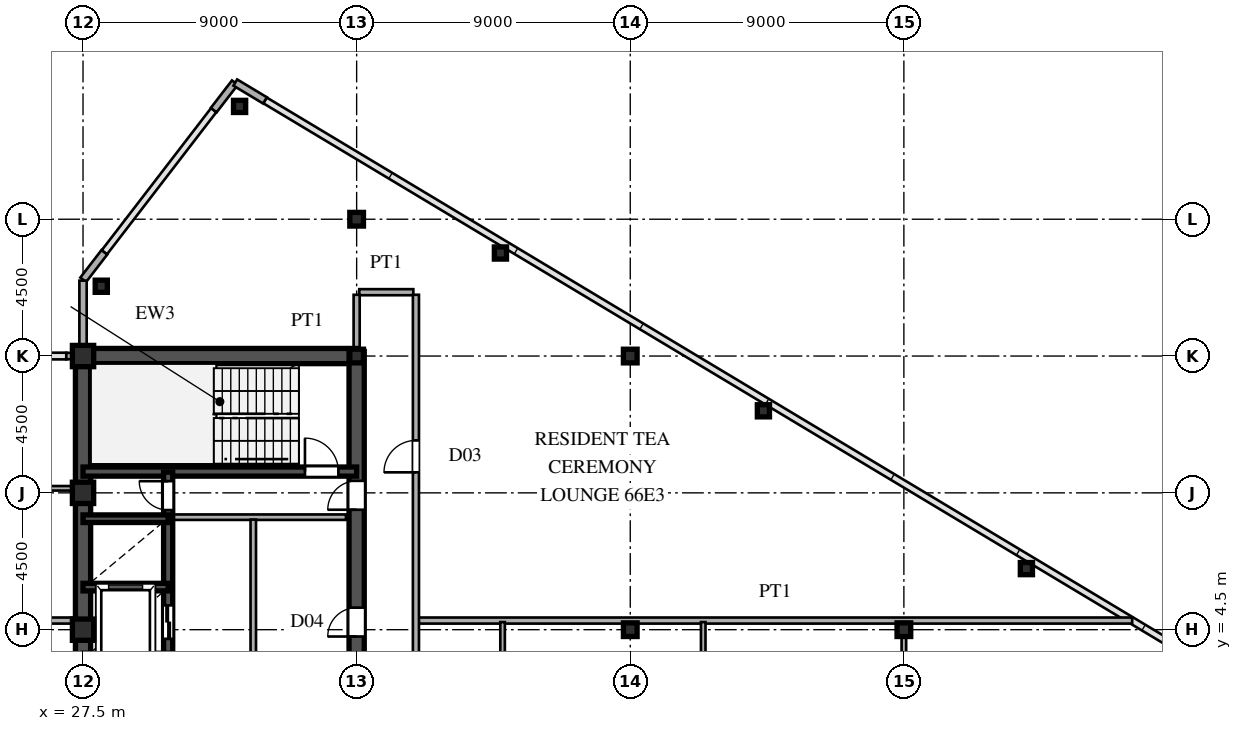
"""IFC4 building model, lengths in metres.
Left out: names, types, materials, properties, quantities, classifications, styles, units other than length and angle.
Written with IfcOpenShell. Run it as: python <this file> out.ifc"""

import sys

from ifc_helpers import new_model, si_unit, direction, frame, frame_2d, origin, origin_2d, place, context, subcontext, project, spatial, rectangle, hollow_rectangle, i_section, extrude, source, transform, mapped, element, fill, save


model = new_model("IFC4")
c1 = context("Model", 3, precision=1e-05, world=origin(), true_north=direction((0.0, 1.0)))
c2 = subcontext(c1, "Body", "Model", "MODEL_VIEW")
j1 = project(units=[si_unit("LENGTHUNIT", "METRE"), si_unit("PLANEANGLEUNIT", "RADIAN")], contexts=[c1])
p1 = place(None, origin())
s1 = spatial("IfcSite", under=j1, at=p1, CompositionType="ELEMENT")
p2 = place(p1, origin())
s2 = spatial("IfcBuilding", under=s1, at=p2, CompositionType="ELEMENT")
p3 = place(p2, frame((0.0, 0.0, 250.65)))
s3 = spatial("IfcBuildingStorey", under=s2, at=p3, CompositionType="ELEMENT", Elevation=250.65)
m1 = source(origin(), c2, "Body", "SweptSolid", [
    extrude(hollow_rectangle(XDim=0.7, YDim=0.7, WallThickness=0.03, at=origin_2d()), origin(), (0.0, 0.0, 1.0), 3.75),
])
for number, where, z_axis, x_axis in (
    (1, (27.5, 4.5, 0.0), (0.0, 0.0, 1.0), (1.0, 0.0, 0.0)),
    (2, (27.5, 9.0, 0.0), (0.0, 0.0, 1.0), (1.0, 0.0, 0.0)),
    (3, (27.5, 13.5, 0.0), (0.0, 0.0, 1.0), (1.0, 0.0, 0.0)),
):
    element("IfcColumn", number, at=place(p3, frame(where, z_axis=z_axis, x_axis=x_axis)), inside=s3, PredefinedType="COLUMN", context=c2, shape_type="MappedRepresentation", body=[
        mapped(m1, transform((0.0, 0.0, 0.0), scale=1.0)),
    ])
m2 = source(origin(), c2, "Body", "SweptSolid", [
    extrude(i_section(OverallWidth=0.45, OverallDepth=0.45, WebThickness=0.016, FlangeThickness=0.025, at=origin_2d()), origin(), (0.0, 0.0, 1.0), 3.75),
])
for number, where, z_axis, x_axis in (
    (4, (36.5, 13.5, 0.0), (0.0, 0.0, 1.0), (1.0, 0.0, 0.0)),
    (5, (36.5, 18.0, 0.0), (0.0, 0.0, 1.0), (1.0, 0.0, 0.0)),
    (6, (45.5, 4.5, 0.0), (0.0, 0.0, 1.0), (1.0, 0.0, 0.0)),
    (7, (45.5, 13.5, 0.0), (0.0, 0.0, 1.0), (1.0, 0.0, 0.0)),
    (8, (54.5, 4.5, 0.0), (0.0, 0.0, 1.0), (1.0, 0.0, 0.0)),
):
    element("IfcColumn", number, at=place(p3, frame(where, z_axis=z_axis, x_axis=x_axis)), inside=s3, PredefinedType="COLUMN", context=c2, shape_type="MappedRepresentation", body=[
        mapped(m2, transform((0.0, 0.0, 0.0), scale=1.0)),
    ])
m3 = source(origin(), c2, "Body", "SweptSolid", [
    extrude(hollow_rectangle(XDim=0.4, YDim=0.4, WallThickness=0.016, at=origin_2d()), origin(), (0.0, 0.0, 1.0), 3.75),
])
for number, where, z_axis, x_axis in (
    (9, (32.65, 21.71, 0.0), (0.0, 0.0, 1.0), (1.0, 0.0, 0.0)),
    (10, (28.1, 15.796, 0.0), (0.0, 0.0, 1.0), (1.0, 0.0, 0.0)),
    (11, (41.23, 16.889, 0.0), (0.0, 0.0, 1.0), (1.0, 0.0, 0.0)),
    (12, (49.88, 11.699, 0.0), (0.0, 0.0, 1.0), (1.0, 0.0, 0.0)),
    (13, (58.53, 6.509, 0.0), (0.0, 0.0, 1.0), (1.0, 0.0, 0.0)),
):
    element("IfcColumn", number, at=place(p3, frame(where, z_axis=z_axis, x_axis=x_axis)), inside=s3, PredefinedType="COLUMN", context=c2, shape_type="MappedRepresentation", body=[
        mapped(m3, transform((0.0, 0.0, 0.0), scale=1.0)),
    ])
for number, where, z_axis, x_axis in (
    (14, (33.486, 21.908, 0.0), (0.0, 0.0, 1.0), (-0.857, 0.515, 0.0)),
    (15, (32.494, 22.492, 0.0), (0.0, 0.0, 1.0), (-0.61, -0.793, 0.0)),
    (16, (28.201, 16.912, 0.0), (0.0, 0.0, 1.0), (-0.61, -0.793, 0.0)),
):
    element("IfcWall", number, at=place(p3, frame(where, z_axis=z_axis, x_axis=x_axis)), inside=s3, PredefinedType="SOLIDWALL", context=c2, shape_type="SweptSolid", body=[
        extrude(rectangle(XDim=1.14, YDim=0.24, at=frame_2d((0.57, 0.0))), origin(), (0.0, 0.0, 1.0), 3.53),
    ])
p4 = place(p3, frame((27.5, 13.755, 0.0), z_axis=(0.0, 0.0, 1.0), x_axis=(0.0, 1.0, 0.0)))
e17 = element("IfcWall", 17, at=p4, inside=s3, PredefinedType="SOLIDWALL", context=c2, shape_type="SweptSolid", body=[
    extrude(rectangle(XDim=0.62, YDim=0.24, at=frame_2d((0.31, 0.0))), origin(), (0.0, 0.0, 1.0), 3.03),
])
p5 = place(p3, frame((27.5, 14.375, 0.0), z_axis=(0.0, 0.0, 1.0), x_axis=(0.0, 1.0, 0.0)))
e18 = element("IfcWall", 18, at=p5, inside=s3, PredefinedType="SOLIDWALL", context=c2, shape_type="SweptSolid", body=[
    extrude(rectangle(XDim=1.605, YDim=0.24, at=frame_2d((0.803, 0.0))), origin(), (0.0, 0.0, 1.0), 3.53),
])
p6 = place(p3, frame((26.95, 13.5, 0.0), z_axis=(0.0, 0.0, 1.0), x_axis=(1.0, 0.0, 0.0)))
e19 = element("IfcWall", 19, at=p6, inside=s3, PredefinedType="SOLIDWALL", context=c2, shape_type="SweptSolid", body=[
    extrude(rectangle(XDim=0.54, YDim=0.21, at=frame_2d((0.27, 0.0))), origin(), (0.0, 0.0, 1.0), 3.03),
])
p7 = place(p3, frame((27.5, 1.3, 0.0), z_axis=(0.0, 0.0, 1.0), x_axis=(0.0, 1.0, 0.0)))
e20 = element("IfcWall", 20, at=p7, inside=s3, PredefinedType="SHEAR", context=c2, shape_type="SweptSolid", body=[
    extrude(rectangle(XDim=12.2, YDim=0.5, at=frame_2d((6.1, 0.0))), origin(), (0.0, 0.0, 1.0), 3.53),
])
p8 = place(p3, frame((27.5, 13.5, 0.0), z_axis=(0.0, 0.0, 1.0), x_axis=(1.0, 0.0, 0.0)))
e21 = element("IfcWall", 21, at=p8, inside=s3, PredefinedType="SHEAR", context=c2, shape_type="SweptSolid", body=[
    extrude(rectangle(XDim=9.0, YDim=0.5, at=frame_2d((4.5, 0.0))), origin(), (0.0, 0.0, 1.0), 3.53),
])
p9 = place(p3, frame((36.5, 8.2, 0.0), z_axis=(0.0, 0.0, 1.0), x_axis=(0.0, 1.0, 0.0)))
e22 = element("IfcWall", 22, at=p9, inside=s3, PredefinedType="SHEAR", context=c2, shape_type="SweptSolid", body=[
    extrude(rectangle(XDim=5.45, YDim=0.5, at=frame_2d((2.725, 0.0))), origin(), (0.0, 0.0, 1.0), 3.53),
])
p10 = place(p9, frame((0.245, 0.0, 0.0)))
e23 = element("IfcOpeningElement", 23, at=p10, cuts=e22, PredefinedType="OPENING", context=c2, shape_type="SweptSolid", body=[
    extrude(rectangle(XDim=0.95, YDim=2.15, at=frame_2d((0.475, 1.075))), frame((0.0, 0.26, 0.0), z_axis=(0.0, -1.0, 0.0), x_axis=(1.0, 0.0, 0.0)), (0.0, 0.0, 1.0), 0.52),
])
p11 = place(p3, frame((36.5, 1.3, 0.0), z_axis=(0.0, 0.0, 1.0), x_axis=(0.0, 1.0, 0.0)))
e24 = element("IfcWall", 24, at=p11, inside=s3, PredefinedType="SHEAR", context=c2, shape_type="SweptSolid", body=[
    extrude(rectangle(XDim=6.9, YDim=0.5, at=frame_2d((3.45, 0.0))), origin(), (0.0, 0.0, 1.0), 3.53),
])
p12 = place(p11, frame((2.975, 0.0, 0.0)))
e25 = element("IfcOpeningElement", 25, at=p12, cuts=e24, PredefinedType="OPENING", context=c2, shape_type="SweptSolid", body=[
    extrude(rectangle(XDim=0.95, YDim=2.15, at=frame_2d((0.475, 1.075))), frame((0.0, 0.26, 0.0), z_axis=(0.0, -1.0, 0.0), x_axis=(1.0, 0.0, 0.0)), (0.0, 0.0, 1.0), 0.52),
])
p13 = place(p3, frame((27.5, 9.7, 0.0), z_axis=(0.0, 0.0, 1.0), x_axis=(1.0, 0.0, 0.0)))
e26 = element("IfcWall", 26, at=p13, inside=s3, PredefinedType="SHEAR", context=c2, shape_type="SweptSolid", body=[
    extrude(rectangle(XDim=9.0, YDim=0.3, at=frame_2d((4.5, 0.0))), origin(), (0.0, 0.0, 1.0), 3.53),
])
p14 = place(p13, frame((7.3, 0.0, 0.0)))
e27 = element("IfcOpeningElement", 27, at=p14, cuts=e26, PredefinedType="OPENING", context=c2, shape_type="SweptSolid", body=[
    extrude(rectangle(XDim=1.1, YDim=2.2, at=frame_2d((0.55, 1.1))), frame((0.0, 0.16, 0.0), z_axis=(0.0, -1.0, 0.0), x_axis=(1.0, 0.0, 0.0)), (0.0, 0.0, 1.0), 0.32),
])
for number, where, z_axis, x_axis in (
    (28, (27.5, 5.9, 0.0), (0.0, 0.0, 1.0), (1.0, 0.0, 0.0)),
    (29, (27.5, 8.15, 0.0), (0.0, 0.0, 1.0), (1.0, 0.0, 0.0)),
):
    element("IfcWall", number, at=place(p3, frame(where, z_axis=z_axis, x_axis=x_axis)), inside=s3, PredefinedType="SHEAR", context=c2, shape_type="SweptSolid", body=[
        extrude(rectangle(XDim=2.8, YDim=0.25, at=frame_2d((1.4, 0.0))), origin(), (0.0, 0.0, 1.0), 3.53),
    ])
p15 = place(p3, frame((30.3, 3.6, 0.0), z_axis=(0.0, 0.0, 1.0), x_axis=(0.0, 1.0, 0.0)))
e30 = element("IfcWall", 30, at=p15, inside=s3, PredefinedType="SHEAR", context=c2, shape_type="SweptSolid", body=[
    extrude(rectangle(XDim=2.3, YDim=0.3, at=frame_2d((1.15, 0.0))), origin(), (0.0, 0.0, 1.0), 3.53),
])
p16 = place(p15, frame((0.6, 0.0, 0.0)))
e31 = element("IfcOpeningElement", 31, at=p16, cuts=e30, PredefinedType="OPENING", context=c2, shape_type="SweptSolid", body=[
    extrude(rectangle(XDim=1.1, YDim=2.2, at=frame_2d((0.55, 1.1))), frame((0.0, 0.16, 0.0), z_axis=(0.0, -1.0, 0.0), x_axis=(1.0, 0.0, 0.0)), (0.0, 0.0, 1.0), 0.32),
])
p17 = place(p3, frame((30.3, 5.9, 0.0), z_axis=(0.0, 0.0, 1.0), x_axis=(0.0, 1.0, 0.0)))
e32 = element("IfcWall", 32, at=p17, inside=s3, PredefinedType="SHEAR", context=c2, shape_type="SweptSolid", body=[
    extrude(rectangle(XDim=2.25, YDim=0.3, at=frame_2d((1.125, 0.0))), origin(), (0.0, 0.0, 1.0), 3.53),
])
p18 = place(p3, frame((30.3, 8.15, 0.0), z_axis=(0.0, 0.0, 1.0), x_axis=(0.0, 1.0, 0.0)))
e33 = element("IfcWall", 33, at=p18, inside=s3, PredefinedType="SHEAR", context=c2, shape_type="SweptSolid", body=[
    extrude(rectangle(XDim=1.53, YDim=0.3, at=frame_2d((0.765, 0.0))), origin(), (0.0, 0.0, 1.0), 3.53),
])
p19 = place(p18, frame((0.285, 0.0, 0.0)))
e34 = element("IfcOpeningElement", 34, at=p19, cuts=e33, PredefinedType="OPENING", context=c2, shape_type="SweptSolid", body=[
    extrude(rectangle(XDim=0.95, YDim=2.15, at=frame_2d((0.475, 1.075))), frame((0.0, 0.16, 0.0), z_axis=(0.0, -1.0, 0.0), x_axis=(1.0, 0.0, 0.0)), (0.0, 0.0, 1.0), 0.32),
])
p20 = place(p3, frame((30.45, 8.2, 0.0), z_axis=(0.0, 0.0, 1.0), x_axis=(1.0, 0.0, 0.0)))
e35 = element("IfcWall", 35, at=p20, inside=s3, PredefinedType="PARTITIONING", context=c2, shape_type="SweptSolid", body=[
    extrude(rectangle(XDim=5.7, YDim=0.18, at=frame_2d((2.85, 0.0))), origin(), (0.0, 0.0, 1.0), 3.53),
])
p21 = place(p3, frame((33.1, 1.38, 0.0), z_axis=(0.0, 0.0, 1.0), x_axis=(0.0, 1.0, 0.0)))
e36 = element("IfcWall", 36, at=p21, inside=s3, PredefinedType="PARTITIONING", context=c2, shape_type="SweptSolid", body=[
    extrude(rectangle(XDim=6.74, YDim=0.18, at=frame_2d((3.37, 0.0))), origin(), (0.0, 0.0, 1.0), 3.53),
])
p22 = place(p3, frame((-27.245, 4.8, 0.0), z_axis=(0.0, 0.0, 1.0), x_axis=(1.0, 0.0, 0.0)))
e37 = element("IfcWall", 37, at=p22, inside=s3, PredefinedType="PARTITIONING", context=c2, shape_type="SweptSolid", body=[
    extrude(rectangle(XDim=54.49, YDim=0.2, at=frame_2d((27.245, 0.0))), origin(), (0.0, 0.0, 1.0), 3.53),
])
p23 = place(p22, frame((24.97, 0.0, 0.0)))
e38 = element("IfcOpeningElement", 38, at=p23, cuts=e37, PredefinedType="OPENING", context=c2, shape_type="SweptSolid", body=[
    extrude(rectangle(XDim=1.05, YDim=2.25, at=frame_2d((0.525, 1.125))), frame((0.0, 0.11, 0.0), z_axis=(0.0, -1.0, 0.0), x_axis=(1.0, 0.0, 0.0)), (0.0, 0.0, 1.0), 0.22),
])
p24 = place(p3, frame((38.53, 4.8, 0.0), z_axis=(0.0, 0.0, 1.0), x_axis=(1.0, 0.0, 0.0)))
e39 = element("IfcWall", 39, at=p24, inside=s3, PredefinedType="PARTITIONING", context=c2, shape_type="SweptSolid", body=[
    extrude(rectangle(XDim=23.48, YDim=0.2, at=frame_2d((11.74, 0.0))), origin(), (0.0, 0.0, 1.0), 3.53),
])
p25 = place(p3, frame((7.085, 9.15, 0.0), z_axis=(0.0, 0.0, 1.0), x_axis=(1.0, 0.0, 0.0)))
e40 = element("IfcWall", 40, at=p25, inside=s3, PredefinedType="PARTITIONING", context=c2, shape_type="SweptSolid", body=[
    extrude(rectangle(XDim=20.16, YDim=0.15, at=frame_2d((10.08, 0.0))), origin(), (0.0, 0.0, 1.0), 3.53),
])
p26 = place(p25, frame((3.44, 0.0, 0.0)))
e41 = element("IfcOpeningElement", 41, at=p26, cuts=e40, PredefinedType="OPENING", context=c2, shape_type="SweptSolid", body=[
    extrude(rectangle(XDim=0.95, YDim=2.15, at=frame_2d((0.475, 1.075))), frame((0.0, 0.085, 0.0), z_axis=(0.0, -1.0, 0.0), x_axis=(1.0, 0.0, 0.0)), (0.0, 0.0, 1.0), 0.17),
])
p27 = place(p25, frame((10.69, 0.0, 0.0)))
e42 = element("IfcOpeningElement", 42, at=p27, cuts=e40, PredefinedType="OPENING", context=c2, shape_type="SweptSolid", body=[
    extrude(rectangle(XDim=0.95, YDim=2.15, at=frame_2d((0.475, 1.075))), frame((0.0, 0.085, 0.0), z_axis=(0.0, -1.0, 0.0), x_axis=(1.0, 0.0, 0.0)), (0.0, 0.0, 1.0), 0.17),
])
p28 = place(p25, frame((16.94, 0.0, 0.0)))
e43 = element("IfcOpeningElement", 43, at=p28, cuts=e40, PredefinedType="OPENING", context=c2, shape_type="SweptSolid", body=[
    extrude(rectangle(XDim=0.95, YDim=2.15, at=frame_2d((0.475, 1.075))), frame((0.0, 0.085, 0.0), z_axis=(0.0, -1.0, 0.0), x_axis=(1.0, 0.0, 0.0)), (0.0, 0.0, 1.0), 0.17),
])
p29 = place(p3, frame((36.585, 15.6, 0.0), z_axis=(0.0, 0.0, 1.0), x_axis=(1.0, 0.0, 0.0)))
e44 = element("IfcWall", 44, at=p29, inside=s3, PredefinedType="PARTITIONING", context=c2, shape_type="SweptSolid", body=[
    extrude(rectangle(XDim=1.78, YDim=0.2, at=frame_2d((0.89, 0.0))), origin(), (0.0, 0.0, 1.0), 3.53),
])
p30 = place(p3, frame((36.5, 13.755, 0.0), z_axis=(0.0, 0.0, 1.0), x_axis=(0.0, 1.0, 0.0)))
e45 = element("IfcWall", 45, at=p30, inside=s3, PredefinedType="PARTITIONING", context=c2, shape_type="SweptSolid", body=[
    extrude(rectangle(XDim=1.76, YDim=0.2, at=frame_2d((0.88, 0.0))), origin(), (0.0, 0.0, 1.0), 2.93),
])
p31 = place(p3, frame((38.45, -15.515, 0.0), z_axis=(0.0, 0.0, 1.0), x_axis=(0.0, 1.0, 0.0)))
e46 = element("IfcWall", 46, at=p31, inside=s3, PredefinedType="PARTITIONING", context=c2, shape_type="SweptSolid", body=[
    extrude(rectangle(XDim=31.03, YDim=0.2, at=frame_2d((15.515, 0.0))), origin(), (0.0, 0.0, 1.0), 3.53),
])
p32 = place(p31, frame((3.09, 0.0, 0.0)))
e47 = element("IfcOpeningElement", 47, at=p32, cuts=e46, PredefinedType="OPENING", context=c2, shape_type="SweptSolid", body=[
    extrude(rectangle(XDim=1.05, YDim=2.25, at=frame_2d((0.525, 1.125))), frame((0.0, 0.11, 0.0), z_axis=(0.0, -1.0, 0.0), x_axis=(1.0, 0.0, 0.0)), (0.0, 0.0, 1.0), 0.22),
])
p33 = place(p31, frame((13.095, 0.0, 0.0)))
e48 = element("IfcOpeningElement", 48, at=p33, cuts=e46, PredefinedType="OPENING", context=c2, shape_type="SweptSolid", body=[
    extrude(rectangle(XDim=1.05, YDim=2.25, at=frame_2d((0.525, 1.125))), frame((0.0, 0.11, 0.0), z_axis=(0.0, -1.0, 0.0), x_axis=(1.0, 0.0, 0.0)), (0.0, 0.0, 1.0), 0.22),
])
p34 = place(p31, frame((25.19, 0.0, 0.0)))
e49 = element("IfcOpeningElement", 49, at=p34, cuts=e46, PredefinedType="OPENING", context=c2, shape_type="SweptSolid", body=[
    extrude(rectangle(XDim=1.05, YDim=2.25, at=frame_2d((0.525, 1.125))), frame((0.0, 0.11, 0.0), z_axis=(0.0, -1.0, 0.0), x_axis=(1.0, 0.0, 0.0)), (0.0, 0.0, 1.0), 0.22),
])
p35 = place(p3, frame((41.3, 0.952, 0.0), z_axis=(0.0, 0.0, 1.0), x_axis=(0.0, 1.0, 0.0)))
e50 = element("IfcWall", 50, at=p35, inside=s3, PredefinedType="PARTITIONING", context=c2, shape_type="SweptSolid", body=[
    extrude(rectangle(XDim=3.798, YDim=0.15, at=frame_2d((1.899, 0.0))), origin(), (0.0, 0.0, 1.0), 3.53),
])
p36 = place(p3, frame((47.9, -8.15, 0.0), z_axis=(0.0, 0.0, 1.0), x_axis=(0.0, 1.0, 0.0)))
e51 = element("IfcWall", 51, at=p36, inside=s3, PredefinedType="PARTITIONING", context=c2, shape_type="SweptSolid", body=[
    extrude(rectangle(XDim=12.9, YDim=0.15, at=frame_2d((6.45, 0.0))), origin(), (0.0, 0.0, 1.0), 3.53),
])
p37 = place(p36, frame((5.975, 0.0, 0.0)))
e52 = element("IfcOpeningElement", 52, at=p37, cuts=e51, PredefinedType="OPENING", context=c2, shape_type="SweptSolid", body=[
    extrude(rectangle(XDim=0.95, YDim=2.15, at=frame_2d((0.475, 1.075))), frame((0.0, 0.085, 0.0), z_axis=(0.0, -1.0, 0.0), x_axis=(1.0, 0.0, 0.0)), (0.0, 0.0, 1.0), 0.17),
])
p38 = place(p36, frame((1.642, 0.0, 0.0)))
e53 = element("IfcOpeningElement", 53, at=p38, cuts=e51, PredefinedType="OPENING", context=c2, shape_type="SweptSolid", body=[
    extrude(rectangle(XDim=0.95, YDim=2.15, at=frame_2d((0.475, 1.075))), frame((0.0, 0.085, 0.0), z_axis=(0.0, -1.0, 0.0), x_axis=(1.0, 0.0, 0.0)), (0.0, 0.0, 1.0), 0.17),
])
p39 = place(p3, frame((54.5, -8.15, 0.0), z_axis=(0.0, 0.0, 1.0), x_axis=(0.0, 1.0, 0.0)))
e54 = element("IfcWall", 54, at=p39, inside=s3, PredefinedType="PARTITIONING", context=c2, shape_type="SweptSolid", body=[
    extrude(rectangle(XDim=12.9, YDim=0.15, at=frame_2d((6.45, 0.0))), origin(), (0.0, 0.0, 1.0), 2.93),
])
p40 = place(p39, frame((5.975, 0.0, 0.0)))
e55 = element("IfcOpeningElement", 55, at=p40, cuts=e54, PredefinedType="OPENING", context=c2, shape_type="SweptSolid", body=[
    extrude(rectangle(XDim=0.95, YDim=2.15, at=frame_2d((0.475, 1.075))), frame((0.0, 0.085, 0.0), z_axis=(0.0, -1.0, 0.0), x_axis=(1.0, 0.0, 0.0)), (0.0, 0.0, 1.0), 0.17),
])
p41 = place(p39, frame((1.642, 0.0, 0.0)))
e56 = element("IfcOpeningElement", 56, at=p41, cuts=e54, PredefinedType="OPENING", context=c2, shape_type="SweptSolid", body=[
    extrude(rectangle(XDim=0.95, YDim=2.15, at=frame_2d((0.475, 1.075))), frame((0.0, 0.085, 0.0), z_axis=(0.0, -1.0, 0.0), x_axis=(1.0, 0.0, 0.0)), (0.0, 0.0, 1.0), 0.17),
])
p42 = place(p39, frame((10.308, 0.0, 0.0)))
e57 = element("IfcOpeningElement", 57, at=p42, cuts=e54, PredefinedType="OPENING", context=c2, shape_type="SweptSolid", body=[
    extrude(rectangle(XDim=0.95, YDim=2.15, at=frame_2d((0.475, 1.075))), frame((0.0, 0.085, 0.0), z_axis=(0.0, -1.0, 0.0), x_axis=(1.0, 0.0, 0.0)), (0.0, 0.0, 1.0), 0.17),
])
m4 = source(origin(), c2, "Body", "SweptSolid", [
    extrude(rectangle(XDim=0.95, YDim=2.15, at=frame_2d((0.475, 1.075))), frame((0.0, 0.025, 0.0), z_axis=(0.0, -1.0, 0.0), x_axis=(1.0, 0.0, 0.0)), (0.0, 0.0, 1.0), 0.05),
])
p43 = place(p10, origin())
e58 = element("IfcDoor", 58, at=p43, inside=s3, OperationType="SINGLE_SWING_LEFT", PredefinedType="DOOR", context=c2, shape_type="MappedRepresentation", body=[
    mapped(m4, transform((0.0, 0.0, 0.0), scale=1.0)),
])
fill(e23, e58)
p44 = place(p12, origin())
e59 = element("IfcDoor", 59, at=p44, inside=s3, OperationType="SINGLE_SWING_LEFT", PredefinedType="DOOR", context=c2, shape_type="MappedRepresentation", body=[
    mapped(m4, transform((0.0, 0.0, 0.0), scale=1.0)),
])
fill(e25, e59)
m5 = source(origin(), c2, "Body", "SweptSolid", [
    extrude(rectangle(XDim=1.1, YDim=2.2, at=frame_2d((0.55, 1.1))), frame((0.0, 0.025, 0.0), z_axis=(0.0, -1.0, 0.0), x_axis=(1.0, 0.0, 0.0)), (0.0, 0.0, 1.0), 0.05),
])
p45 = place(p14, origin())
e60 = element("IfcDoor", 60, at=p45, inside=s3, OperationType="SINGLE_SWING_LEFT", PredefinedType="DOOR", context=c2, shape_type="MappedRepresentation", body=[
    mapped(m5, transform((0.0, 0.0, 0.0), scale=1.0)),
])
fill(e27, e60)
m6 = source(origin(), c2, "Body", "SweptSolid", [
    extrude(rectangle(XDim=1.1, YDim=2.2, at=frame_2d((0.55, 1.1))), frame((0.0, 0.025, 0.0), z_axis=(0.0, -1.0, 0.0), x_axis=(1.0, 0.0, 0.0)), (0.0, 0.0, 1.0), 0.05),
])
p46 = place(p16, origin())
e61 = element("IfcDoor", 61, at=p46, inside=s3, OperationType="DOUBLE_DOOR_SLIDING", PredefinedType="DOOR", context=c2, shape_type="MappedRepresentation", body=[
    mapped(m6, transform((0.0, 0.0, 0.0), scale=1.0)),
])
fill(e31, e61)
p47 = place(p19, origin())
e62 = element("IfcDoor", 62, at=p47, inside=s3, OperationType="SINGLE_SWING_RIGHT", PredefinedType="DOOR", context=c2, shape_type="MappedRepresentation", body=[
    mapped(m4, transform((0.0, 0.0, 0.0), scale=1.0)),
])
fill(e34, e62)
m7 = source(origin(), c2, "Body", "SweptSolid", [
    extrude(rectangle(XDim=1.05, YDim=2.25, at=frame_2d((0.525, 1.125))), frame((0.0, 0.025, 0.0), z_axis=(0.0, -1.0, 0.0), x_axis=(1.0, 0.0, 0.0)), (0.0, 0.0, 1.0), 0.05),
])
p48 = place(p34, origin())
e63 = element("IfcDoor", 63, at=p48, inside=s3, OperationType="SINGLE_SWING_LEFT", PredefinedType="DOOR", context=c2, shape_type="MappedRepresentation", body=[
    mapped(m7, transform((0.0, 0.0, 0.0), scale=1.0)),
])
fill(e49, e63)
save(model, sys.argv[1])
